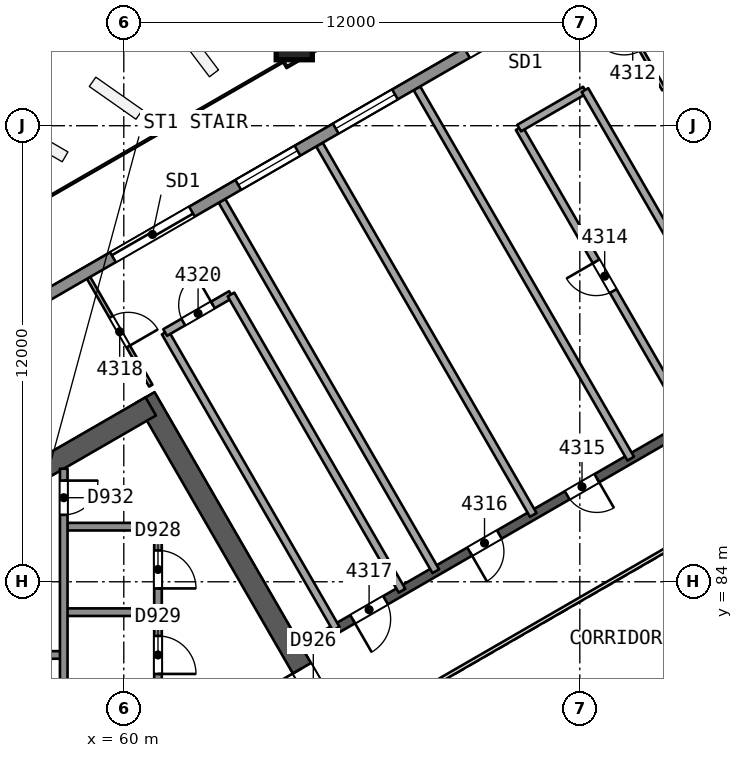
"""IFC4 building model, lengths in metres.
Left out: names, types, materials, properties, quantities, classifications, styles, units other than length and angle.
Written with IfcOpenShell. Run it as: python <this file> out.ifc"""

import sys

from ifc_helpers import new_model, si_unit, direction, frame, frame_2d, origin, origin_2d, place, context, subcontext, project, spatial, rectangle, extrude, element, fill, save


model = new_model("IFC4")
c1 = context("Model", 3, precision=1e-05, world=origin(), true_north=direction((0.0, 1.0)))
c2 = subcontext(c1, "Body", "Model", "MODEL_VIEW")
j1 = project(units=[si_unit("LENGTHUNIT", "METRE"), si_unit("PLANEANGLEUNIT", "RADIAN")], contexts=[c1])
p1 = place(None, origin())
s1 = spatial("IfcSite", under=j1, at=p1, CompositionType="ELEMENT")
p2 = place(p1, origin())
s2 = spatial("IfcBuilding", under=s1, at=p2, CompositionType="ELEMENT")
p3 = place(p2, frame((0.0, 0.0, 178.5)))
s3 = spatial("IfcBuildingStorey", under=s2, at=p3, CompositionType="ELEMENT", Elevation=178.5)
p4 = place(p3, frame((65.682, 80.0, 0.0), z_axis=(0.0, 0.0, 1.0), x_axis=(-0.500000202252, 0.866025287014, 0.0)))
e1 = element("IfcWall", 1, at=p4, inside=s3, PredefinedType="SHEAR", context=c2, shape_type="SweptSolid", body=[
    extrude(rectangle(XDim=10.221, YDim=0.55, at=frame_2d((5.111, 0.0))), origin(), (0.0, 0.0, 1.0), 3.7),
])
p5 = place(p4, frame((0.791, 0.0, 0.0)))
e2 = element("IfcOpeningElement", 2, at=p5, cuts=e1, PredefinedType="OPENING", context=c2, shape_type="SweptSolid", body=[
    extrude(rectangle(XDim=1.2, YDim=2.1, at=frame_2d((0.6, 1.05))), frame((0.0, 0.286, 0.0), z_axis=(0.0, -1.0, 0.0), x_axis=(1.0, 0.0, 0.0)), (0.0, 0.0, 1.0), 0.571),
])
p6 = place(p3, frame((60.709, 88.614, 0.0), z_axis=(0.0, 0.0, 1.0), x_axis=(-0.866020164116, -0.500009075263, 0.0)))
e3 = element("IfcWall", 3, at=p6, inside=s3, PredefinedType="SHEAR", context=c2, shape_type="SweptSolid", body=[
    extrude(rectangle(XDim=14.058, YDim=0.55, at=frame_2d((7.029, 0.0))), origin(), (0.0, 0.0, 1.0), 3.7),
])
p7 = place(p3, frame((78.2, 90.046, 0.0), z_axis=(0.0, 0.0, 1.0), x_axis=(-0.866026492143, -0.499998114903, 0.0)))
e4 = element("IfcWall", 4, at=p7, inside=s3, PredefinedType="SHEAR", context=c2, shape_type="SweptSolid", body=[
    extrude(rectangle(XDim=15.588, YDim=0.25, at=frame_2d((7.794, 0.0))), origin(), (0.0, 0.0, 1.0), 3.25),
])
p8 = place(p7, frame((2.306, 0.0, 0.0)))
e5 = element("IfcOpeningElement", 5, at=p8, cuts=e4, PredefinedType="OPENING", context=c2, shape_type="SweptSolid", body=[
    extrude(rectangle(XDim=1.0, YDim=2.1, at=frame_2d((0.5, 1.05))), frame((0.0, 0.135, 0.0), z_axis=(0.0, -1.0, 0.0), x_axis=(1.0, 0.0, 0.0)), (0.0, 0.0, 1.0), 0.271),
])
p9 = place(p7, frame((6.643, 0.0, 0.0)))
e6 = element("IfcOpeningElement", 6, at=p9, cuts=e4, PredefinedType="OPENING", context=c2, shape_type="SweptSolid", body=[
    extrude(rectangle(XDim=0.9, YDim=2.1, at=frame_2d((0.45, 1.05))), frame((0.0, 0.135, 0.0), z_axis=(0.0, -1.0, 0.0), x_axis=(1.0, 0.0, 0.0)), (0.0, 0.0, 1.0), 0.271),
])
p10 = place(p7, frame((9.604, 0.0, 0.0)))
e7 = element("IfcOpeningElement", 7, at=p10, cuts=e4, PredefinedType="OPENING", context=c2, shape_type="SweptSolid", body=[
    extrude(rectangle(XDim=0.9, YDim=2.1, at=frame_2d((0.45, 1.05))), frame((0.0, 0.135, 0.0), z_axis=(0.0, -1.0, 0.0), x_axis=(1.0, 0.0, 0.0)), (0.0, 0.0, 1.0), 0.271),
])
p11 = place(p7, frame((13.062, 0.0, 0.0)))
e8 = element("IfcOpeningElement", 8, at=p11, cuts=e4, PredefinedType="OPENING", context=c2, shape_type="SweptSolid", body=[
    extrude(rectangle(XDim=1.0, YDim=2.1, at=frame_2d((0.5, 1.05))), frame((0.0, 0.135, 0.0), z_axis=(0.0, -1.0, 0.0), x_axis=(1.0, 0.0, 0.0)), (0.0, 0.0, 1.0), 0.271),
])
p12 = place(p3, frame((64.474, 98.231, 0.0), z_axis=(0.010093620709, -0.017482414954, 0.999796221231), x_axis=(-0.499897086036, 0.865849517735, 0.020187025824)))
e9 = element("IfcColumn", 9, at=p12, inside=s3, PredefinedType="COLUMN", context=c2, shape_type="SweptSolid", body=[
    extrude(rectangle(XDim=0.95, YDim=0.95, at=origin_2d()), origin(), (0.0, 0.0, 1.0), 3.701),
])
p13 = place(p3, frame((74.21, 96.956, 0.0), z_axis=(0.0, 0.0, 1.0), x_axis=(-0.499980647919, 0.866036576425, 0.0)))
e10 = element("IfcWall", 10, at=p13, inside=s3, PredefinedType="PARTITIONING", context=c2, shape_type="SweptSolid", body=[
    extrude(rectangle(XDim=3.274, YDim=0.1, at=frame_2d((1.637, 0.0))), origin(), (0.0, 0.0, 1.0), 3.25),
])
p14 = place(p13, frame((1.187, 0.0, 0.0)))
e11 = element("IfcOpeningElement", 11, at=p14, cuts=e10, PredefinedType="OPENING", context=c2, shape_type="SweptSolid", body=[
    extrude(rectangle(XDim=0.9, YDim=2.1, at=frame_2d((0.45, 1.05))), frame((0.0, 0.061, 0.0), z_axis=(0.0, -1.0, 0.0), x_axis=(1.0, 0.0, 0.0)), (0.0, 0.0, 1.0), 0.121),
])
p15 = place(p3, frame((74.904, 88.143, 0.0), z_axis=(0.0, 0.0, 1.0), x_axis=(-0.499990139034, 0.866031096941, 0.0)))
e12 = element("IfcWall", 12, at=p15, inside=s3, PredefinedType="PARTITIONING", context=c2, shape_type="SweptSolid", body=[
    extrude(rectangle(XDim=9.0, YDim=0.2, at=frame_2d((4.5, 0.0))), origin(), (0.0, 0.0, 1.0), 3.25),
])
p16 = place(p15, frame((4.05, 0.0, 0.0)))
e13 = element("IfcOpeningElement", 13, at=p16, cuts=e12, PredefinedType="OPENING", context=c2, shape_type="SweptSolid", body=[
    extrude(rectangle(XDim=0.9, YDim=2.1, at=frame_2d((0.45, 1.05))), frame((0.0, 0.11, 0.0), z_axis=(0.0, -1.0, 0.0), x_axis=(1.0, 0.0, 0.0)), (0.0, 0.0, 1.0), 0.221),
])
p17 = place(p3, frame((70.404, 95.937, 0.0), z_axis=(0.0, 0.0, 1.0), x_axis=(0.866010750942, 0.50002537861, 0.0)))
e14 = element("IfcWall", 14, at=p17, inside=s3, PredefinedType="PARTITIONING", context=c2, shape_type="SweptSolid", body=[
    extrude(rectangle(XDim=2.0, YDim=0.2, at=frame_2d((1.0, 0.0))), origin(), (0.0, 0.0, 1.0), 3.25),
])
p18 = place(p3, frame((72.136, 96.937, 0.0), z_axis=(0.0, 0.0, 1.0), x_axis=(0.499990139034, -0.866031096941, 0.0)))
e15 = element("IfcWall", 15, at=p18, inside=s3, PredefinedType="PARTITIONING", context=c2, shape_type="SweptSolid", body=[
    extrude(rectangle(XDim=9.0, YDim=0.2, at=frame_2d((4.5, 0.0))), origin(), (0.0, 0.0, 1.0), 3.25),
])
for number, where, z_axis, x_axis in (
    (16, (67.714, 96.985, 0.0), (0.0, 0.0, 1.0), (0.5, -0.866, 0.0)),
    (17, (65.148, 95.504, 0.0), (0.0, 0.0, 1.0), (0.5, -0.866, 0.0)),
    (18, (62.583, 94.023, 0.0), (0.0, 0.0, 1.0), (0.5, -0.866, 0.0)),
):
    element("IfcWall", number, at=place(p3, frame(where, z_axis=z_axis, x_axis=x_axis)), inside=s3, PredefinedType="PARTITIONING", context=c2, shape_type="SweptSolid", body=[
        extrude(rectangle(XDim=11.253, YDim=0.2, at=frame_2d((5.626, 0.0))), origin(), (0.0, 0.0, 1.0), 3.25),
    ])
p19 = place(p3, frame((59.073, 91.997, 0.0), z_axis=(0.0, 0.0, 1.0), x_axis=(0.499980647919, -0.866036576425, 0.0)))
e19 = element("IfcWall", 19, at=p19, inside=s3, PredefinedType="PARTITIONING", context=c2, shape_type="SweptSolid", body=[
    extrude(rectangle(XDim=3.274, YDim=0.1, at=frame_2d((1.637, 0.0))), origin(), (0.0, 0.0, 1.0), 3.25),
])
p20 = place(p19, frame((1.187, 0.0, 0.0)))
e20 = element("IfcOpeningElement", 20, at=p20, cuts=e19, PredefinedType="OPENING", context=c2, shape_type="SweptSolid", body=[
    extrude(rectangle(XDim=0.9, YDim=2.1, at=frame_2d((0.45, 1.05))), frame((0.0, 0.061, 0.0), z_axis=(0.0, -1.0, 0.0), x_axis=(1.0, 0.0, 0.0)), (0.0, 0.0, 1.0), 0.121),
])
p21 = place(p3, frame((65.589, 82.765, 0.0), z_axis=(0.0, 0.0, 1.0), x_axis=(-0.5000018851, 0.866024315419, 0.0)))
e21 = element("IfcWall", 21, at=p21, inside=s3, PredefinedType="PARTITIONING", context=c2, shape_type="SweptSolid", body=[
    extrude(rectangle(XDim=9.0, YDim=0.2, at=frame_2d((4.5, 0.0))), origin(), (0.0, 0.0, 1.0), 3.25),
])
p22 = place(p3, frame((61.089, 90.559, 0.0), z_axis=(0.0, 0.0, 1.0), x_axis=(0.866041268327, 0.499972520799, 0.0)))
e22 = element("IfcWall", 22, at=p22, inside=s3, PredefinedType="PARTITIONING", context=c2, shape_type="SweptSolid", body=[
    extrude(rectangle(XDim=2.0, YDim=0.2, at=frame_2d((1.0, 0.0))), origin(), (0.0, 0.0, 1.0), 3.25),
])
p23 = place(p22, frame((0.55, 0.0, 0.0)))
e23 = element("IfcOpeningElement", 23, at=p23, cuts=e22, PredefinedType="OPENING", context=c2, shape_type="SweptSolid", body=[
    extrude(rectangle(XDim=0.9, YDim=2.1, at=frame_2d((0.45, 1.05))), frame((0.0, 0.11, 0.0), z_axis=(0.0, -1.0, 0.0), x_axis=(1.0, 0.0, 0.0)), (0.0, 0.0, 1.0), 0.221),
])
p24 = place(p3, frame((62.821, 91.559, 0.0), z_axis=(0.0, 0.0, 1.0), x_axis=(0.5000018851, -0.866024315419, 0.0)))
e24 = element("IfcWall", 24, at=p24, inside=s3, PredefinedType="PARTITIONING", context=c2, shape_type="SweptSolid", body=[
    extrude(rectangle(XDim=9.0, YDim=0.2, at=frame_2d((4.5, 0.0))), origin(), (0.0, 0.0, 1.0), 3.25),
])
p25 = place(p3, frame((42.71, 82.722, 0.0), z_axis=(0.0, 0.0, 1.0), x_axis=(0.866026647012, 0.499997846661, 0.0)))
e25 = element("IfcWall", 25, at=p25, inside=s3, PredefinedType="SOLIDWALL", context=c2, shape_type="SweptSolid", body=[
    extrude(rectangle(XDim=53.206, YDim=0.3, at=frame_2d((26.603, 0.0))), origin(), (0.0, 0.0, 1.0), 3.25),
])
p26 = place(p25, frame((30.391, 0.0, 0.0)))
e26 = element("IfcOpeningElement", 26, at=p26, cuts=e25, PredefinedType="OPENING", context=c2, shape_type="SweptSolid", body=[
    extrude(rectangle(XDim=2.4, YDim=2.4, at=frame_2d((1.2, 1.2))), frame((0.0, 0.161, 0.0), z_axis=(0.0, -1.0, 0.0), x_axis=(1.0, 0.0, 0.0)), (0.0, 0.0, 1.0), 0.321),
])
p27 = place(p25, frame((41.356, 0.0, 0.0)))
e27 = element("IfcOpeningElement", 27, at=p27, cuts=e25, PredefinedType="OPENING", context=c2, shape_type="SweptSolid", body=[
    extrude(rectangle(XDim=2.4, YDim=2.4, at=frame_2d((1.2, 1.2))), frame((0.0, 0.161, 0.0), z_axis=(0.0, -1.0, 0.0), x_axis=(1.0, 0.0, 0.0)), (0.0, 0.0, 1.0), 0.321),
])
p28 = place(p25, frame((19.635, 0.0, 0.0)))
e28 = element("IfcOpeningElement", 28, at=p28, cuts=e25, PredefinedType="OPENING", context=c2, shape_type="SweptSolid", body=[
    extrude(rectangle(XDim=2.4, YDim=2.4, at=frame_2d((1.2, 1.2))), frame((0.0, 0.161, 0.0), z_axis=(0.0, -1.0, 0.0), x_axis=(1.0, 0.0, 0.0)), (0.0, 0.0, 1.0), 0.321),
])
p29 = place(p25, frame((9.4, 0.0, 0.0)))
e29 = element("IfcOpeningElement", 29, at=p29, cuts=e25, PredefinedType="OPENING", context=c2, shape_type="SweptSolid", body=[
    extrude(rectangle(XDim=2.4, YDim=2.4, at=frame_2d((1.2, 1.2))), frame((0.0, 0.161, 0.0), z_axis=(0.0, -1.0, 0.0), x_axis=(1.0, 0.0, 0.0)), (0.0, 0.0, 1.0), 0.321),
])
p30 = place(p25, frame((26.404, 0.0, 0.9)))
e30 = element("IfcOpeningElement", 30, at=p30, cuts=e25, PredefinedType="OPENING", context=c2, shape_type="SweptSolid", body=[
    extrude(rectangle(XDim=1.8, YDim=1.5, at=frame_2d((0.9, 0.75))), frame((0.0, 0.161, 0.0), z_axis=(0.0, -1.0, 0.0), x_axis=(1.0, 0.0, 0.0)), (0.0, 0.0, 1.0), 0.321),
])
p31 = place(p25, frame((23.442, 0.0, 0.9)))
e31 = element("IfcOpeningElement", 31, at=p31, cuts=e25, PredefinedType="OPENING", context=c2, shape_type="SweptSolid", body=[
    extrude(rectangle(XDim=1.8, YDim=1.5, at=frame_2d((0.9, 0.75))), frame((0.0, 0.161, 0.0), z_axis=(0.0, -1.0, 0.0), x_axis=(1.0, 0.0, 0.0)), (0.0, 0.0, 1.0), 0.321),
])
for number, where, z_axis, x_axis in (
    (32, (60.9, 85.45, 0.0), (0.0, 0.0, 1.0), (-1.0, 0.0, 0.0)),
    (33, (60.9, 83.2, 0.0), (0.0, 0.0, 1.0), (-1.0, 0.0, 0.0)),
):
    element("IfcWall", number, at=place(p3, frame(where, z_axis=z_axis, x_axis=x_axis)), inside=s3, PredefinedType="SOLIDWALL", context=c2, shape_type="SweptSolid", body=[
        extrude(rectangle(XDim=2.48, YDim=0.2, at=frame_2d((1.24, 0.0))), origin(), (0.0, 0.0, 1.0), 3.25),
    ])
p32 = place(p3, frame((58.42, 82.075, 0.0), z_axis=(0.0, 0.0, 1.0), x_axis=(-1.0, 0.0, 0.0)))
e34 = element("IfcWall", 34, at=p32, inside=s3, PredefinedType="SOLIDWALL", context=c2, shape_type="SweptSolid", body=[
    extrude(rectangle(XDim=7.7, YDim=0.2, at=frame_2d((3.85, 0.0))), origin(), (0.0, 0.0, 1.0), 3.25),
])
p33 = place(p3, frame((60.9, 85.45, 0.0), z_axis=(0.0, 0.0, 1.0), x_axis=(0.0, -1.0, 0.0)))
e35 = element("IfcWall", 35, at=p33, inside=s3, PredefinedType="SOLIDWALL", context=c2, shape_type="SweptSolid", body=[
    extrude(rectangle(XDim=10.9, YDim=0.2, at=frame_2d((5.45, 0.0))), origin(), (0.0, 0.0, 1.0), 3.25),
])
p34 = place(p33, frame((0.625, 0.0, 0.0)))
e36 = element("IfcOpeningElement", 36, at=p34, cuts=e35, PredefinedType="OPENING", context=c2, shape_type="SweptSolid", body=[
    extrude(rectangle(XDim=1.0, YDim=2.1, at=frame_2d((0.5, 1.05))), frame((0.0, 0.11, 0.0), z_axis=(0.0, -1.0, 0.0), x_axis=(1.0, 0.0, 0.0)), (0.0, 0.0, 1.0), 0.221),
])
p35 = place(p33, frame((2.875, 0.0, 0.0)))
e37 = element("IfcOpeningElement", 37, at=p35, cuts=e35, PredefinedType="OPENING", context=c2, shape_type="SweptSolid", body=[
    extrude(rectangle(XDim=1.0, YDim=2.1, at=frame_2d((0.5, 1.05))), frame((0.0, 0.11, 0.0), z_axis=(0.0, -1.0, 0.0), x_axis=(1.0, 0.0, 0.0)), (0.0, 0.0, 1.0), 0.221),
])
p36 = place(p33, frame((6.25, 0.0, 0.0)))
e38 = element("IfcOpeningElement", 38, at=p36, cuts=e35, PredefinedType="OPENING", context=c2, shape_type="SweptSolid", body=[
    extrude(rectangle(XDim=1.0, YDim=2.1, at=frame_2d((0.5, 1.05))), frame((0.0, 0.11, 0.0), z_axis=(0.0, -1.0, 0.0), x_axis=(1.0, 0.0, 0.0)), (0.0, 0.0, 1.0), 0.221),
])
p37 = place(p3, frame((58.42, 86.974, 0.0), z_axis=(0.0, 0.0, 1.0), x_axis=(0.0, -1.0, 0.0)))
e39 = element("IfcWall", 39, at=p37, inside=s3, PredefinedType="SOLIDWALL", context=c2, shape_type="SweptSolid", body=[
    extrude(rectangle(XDim=10.524, YDim=0.2, at=frame_2d((5.262, 0.0))), origin(), (0.0, 0.0, 1.0), 3.25),
])
p38 = place(p37, frame((0.312, 0.0, 0.0)))
e40 = element("IfcOpeningElement", 40, at=p38, cuts=e39, PredefinedType="OPENING", context=c2, shape_type="SweptSolid", body=[
    extrude(rectangle(XDim=0.9, YDim=2.1, at=frame_2d((0.45, 1.05))), frame((0.0, 0.11, 0.0), z_axis=(0.0, -1.0, 0.0), x_axis=(1.0, 0.0, 0.0)), (0.0, 0.0, 1.0), 0.221),
])
p39 = place(p3, frame((77.738, 86.846, 0.0), z_axis=(0.0, 0.0, 1.0), x_axis=(-0.866026658274, -0.499997827154, 0.0)))
e41 = element("IfcWall", 41, at=p39, inside=s3, PredefinedType="PARTITIONING", context=c2, shape_type="SweptSolid", body=[
    extrude(rectangle(XDim=11.588, YDim=0.1, at=frame_2d((5.794, 0.0))), origin(), (0.0, 0.0, 1.0), 3.25),
])
p40 = place(p16, origin())
e42 = element("IfcDoor", 42, at=p40, inside=s3, OperationType="SINGLE_SWING_RIGHT", PredefinedType="NOTDEFINED", context=c2, shape_type="SweptSolid", body=[
    extrude(rectangle(XDim=0.9, YDim=2.1, at=frame_2d((0.45, 1.05))), frame((0.0, 0.025, 0.0), z_axis=(0.0, -1.0, 0.0), x_axis=(1.0, 0.0, 0.0)), (0.0, 0.0, 1.0), 0.05),
])
fill(e13, e42)
p41 = place(p9, origin())
e43 = element("IfcDoor", 43, at=p41, inside=s3, OperationType="SINGLE_SWING_LEFT", PredefinedType="NOTDEFINED", context=c2, shape_type="SweptSolid", body=[
    extrude(rectangle(XDim=0.9, YDim=2.1, at=frame_2d((0.45, 1.05))), frame((0.0, 0.025, 0.0), z_axis=(0.0, -1.0, 0.0), x_axis=(1.0, 0.0, 0.0)), (0.0, 0.0, 1.0), 0.05),
])
fill(e6, e43)
p42 = place(p10, origin())
e44 = element("IfcDoor", 44, at=p42, inside=s3, OperationType="SINGLE_SWING_RIGHT", PredefinedType="NOTDEFINED", context=c2, shape_type="SweptSolid", body=[
    extrude(rectangle(XDim=0.9, YDim=2.1, at=frame_2d((0.45, 1.05))), frame((0.0, 0.025, 0.0), z_axis=(0.0, -1.0, 0.0), x_axis=(1.0, 0.0, 0.0)), (0.0, 0.0, 1.0), 0.05),
])
fill(e7, e44)
p43 = place(p11, origin())
e45 = element("IfcDoor", 45, at=p43, inside=s3, OperationType="SINGLE_SWING_RIGHT", PredefinedType="NOTDEFINED", context=c2, shape_type="SweptSolid", body=[
    extrude(rectangle(XDim=1.0, YDim=2.1, at=frame_2d((0.5, 1.05))), frame((0.0, 0.025, 0.0), z_axis=(0.0, -1.0, 0.0), x_axis=(1.0, 0.0, 0.0)), (0.0, 0.0, 1.0), 0.05),
])
fill(e8, e45)
p44 = place(p20, origin())
e46 = element("IfcDoor", 46, at=p44, inside=s3, OperationType="SINGLE_SWING_RIGHT", PredefinedType="NOTDEFINED", context=c2, shape_type="SweptSolid", body=[
    extrude(rectangle(XDim=0.9, YDim=2.1, at=frame_2d((0.45, 1.05))), frame((0.0, 0.025, 0.0), z_axis=(0.0, -1.0, 0.0), x_axis=(1.0, 0.0, 0.0)), (0.0, 0.0, 1.0), 0.05),
])
fill(e20, e46)
p45 = place(p23, origin())
e47 = element("IfcDoor", 47, at=p45, inside=s3, OperationType="SINGLE_SWING_RIGHT", PredefinedType="NOTDEFINED", context=c2, shape_type="SweptSolid", body=[
    extrude(rectangle(XDim=0.9, YDim=2.1, at=frame_2d((0.45, 1.05))), frame((0.0, 0.025, 0.0), z_axis=(0.0, -1.0, 0.0), x_axis=(1.0, 0.0, 0.0)), (0.0, 0.0, 1.0), 0.05),
])
fill(e23, e47)
p46 = place(p26, origin())
e48 = element("IfcDoor", 48, at=p46, inside=s3, OperationType="SLIDING_TO_LEFT", PredefinedType="NOTDEFINED", context=c2, shape_type="SweptSolid", body=[
    extrude(rectangle(XDim=2.4, YDim=2.4, at=frame_2d((1.2, 1.2))), frame((0.0, 0.025, 0.0), z_axis=(0.0, -1.0, 0.0), x_axis=(1.0, 0.0, 0.0)), (0.0, 0.0, 1.0), 0.05),
])
fill(e26, e48)
p47 = place(p28, origin())
e49 = element("IfcDoor", 49, at=p47, inside=s3, OperationType="SLIDING_TO_LEFT", PredefinedType="NOTDEFINED", context=c2, shape_type="SweptSolid", body=[
    extrude(rectangle(XDim=2.4, YDim=2.4, at=frame_2d((1.2, 1.2))), frame((0.0, 0.025, 0.0), z_axis=(0.0, -1.0, 0.0), x_axis=(1.0, 0.0, 0.0)), (0.0, 0.0, 1.0), 0.05),
])
fill(e28, e49)
p48 = place(p30, origin())
e50 = element("IfcWindow", 50, at=p48, inside=s3, PartitioningType="SINGLE_PANEL", PredefinedType="WINDOW", context=c2, shape_type="SweptSolid", body=[
    extrude(rectangle(XDim=1.8, YDim=1.5, at=frame_2d((0.9, 0.75))), frame((0.0, 0.03, 0.0), z_axis=(0.0, -1.0, 0.0), x_axis=(1.0, 0.0, 0.0)), (0.0, 0.0, 1.0), 0.06),
])
fill(e30, e50)
p49 = place(p31, origin())
e51 = element("IfcWindow", 51, at=p49, inside=s3, PartitioningType="SINGLE_PANEL", PredefinedType="WINDOW", context=c2, shape_type="SweptSolid", body=[
    extrude(rectangle(XDim=1.8, YDim=1.5, at=frame_2d((0.9, 0.75))), frame((0.0, 0.03, 0.0), z_axis=(0.0, -1.0, 0.0), x_axis=(1.0, 0.0, 0.0)), (0.0, 0.0, 1.0), 0.06),
])
fill(e31, e51)
p50 = place(p5, origin())
e52 = element("IfcDoor", 52, at=p50, inside=s3, OperationType="SINGLE_SWING_RIGHT", PredefinedType="NOTDEFINED", context=c2, shape_type="SweptSolid", body=[
    extrude(rectangle(XDim=1.2, YDim=2.1, at=frame_2d((0.6, 1.05))), frame((0.0, 0.025, 0.0), z_axis=(0.0, -1.0, 0.0), x_axis=(1.0, 0.0, 0.0)), (0.0, 0.0, 1.0), 0.05),
])
fill(e2, e52)
p51 = place(p34, origin())
e53 = element("IfcDoor", 53, at=p51, inside=s3, OperationType="SINGLE_SWING_RIGHT", PredefinedType="NOTDEFINED", context=c2, shape_type="SweptSolid", body=[
    extrude(rectangle(XDim=1.0, YDim=2.1, at=frame_2d((0.5, 1.05))), frame((0.0, 0.025, 0.0), z_axis=(0.0, -1.0, 0.0), x_axis=(1.0, 0.0, 0.0)), (0.0, 0.0, 1.0), 0.05),
])
fill(e36, e53)
p52 = place(p35, origin())
e54 = element("IfcDoor", 54, at=p52, inside=s3, OperationType="SINGLE_SWING_RIGHT", PredefinedType="NOTDEFINED", context=c2, shape_type="SweptSolid", body=[
    extrude(rectangle(XDim=1.0, YDim=2.1, at=frame_2d((0.5, 1.05))), frame((0.0, 0.025, 0.0), z_axis=(0.0, -1.0, 0.0), x_axis=(1.0, 0.0, 0.0)), (0.0, 0.0, 1.0), 0.05),
])
fill(e37, e54)
p53 = place(p38, origin())
e55 = element("IfcDoor", 55, at=p53, inside=s3, OperationType="SINGLE_SWING_LEFT", PredefinedType="NOTDEFINED", context=c2, shape_type="SweptSolid", body=[
    extrude(rectangle(XDim=0.9, YDim=2.1, at=frame_2d((0.45, 1.05))), frame((0.0, 0.025, 0.0), z_axis=(0.0, -1.0, 0.0), x_axis=(1.0, 0.0, 0.0)), (0.0, 0.0, 1.0), 0.05),
])
fill(e40, e55)
save(model, sys.argv[1])
